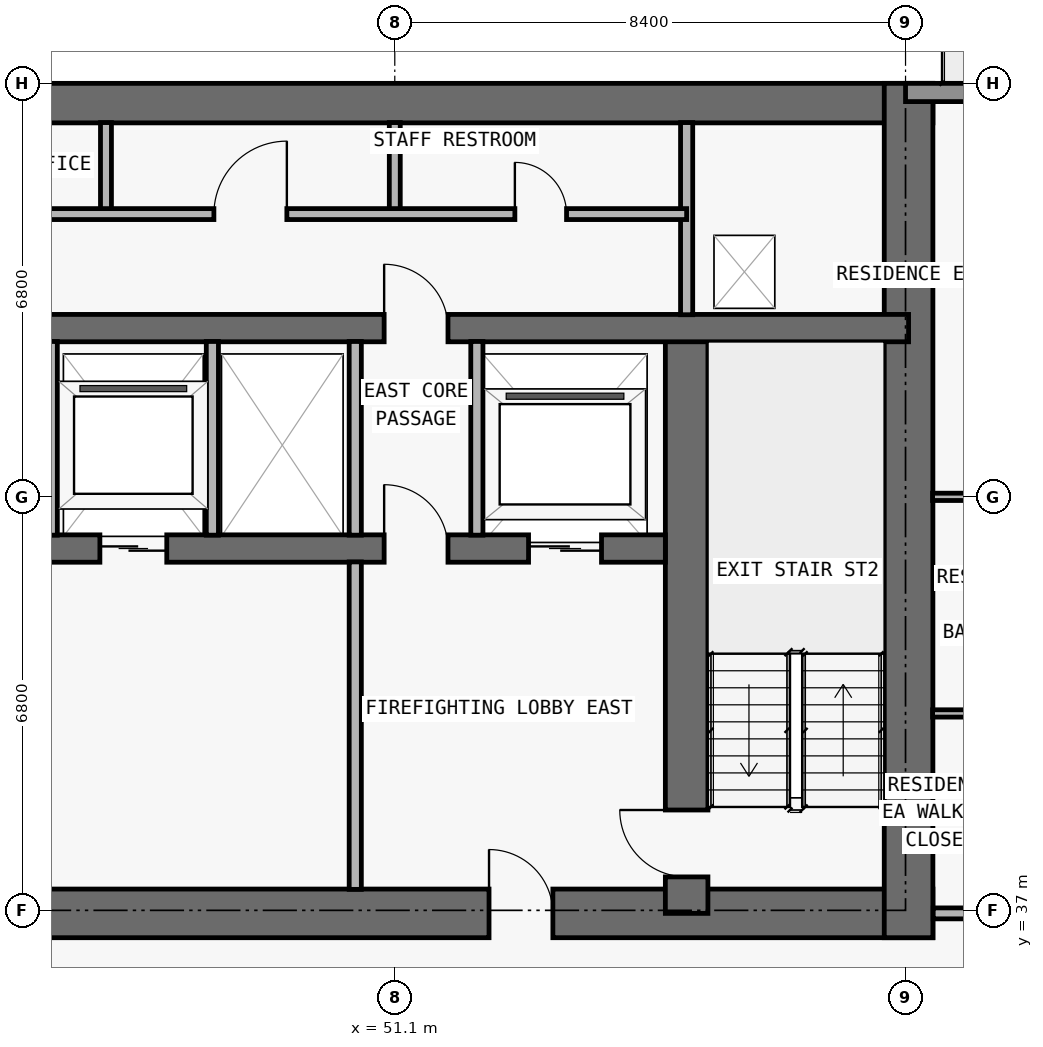
"""IFC4 building model, lengths in metres.
Left out: names, types, materials, properties, quantities, classifications, styles, units other than length and angle.
Written with IfcOpenShell. Run it as: python <this file> out.ifc"""

import sys

from ifc_helpers import new_model, si_unit, direction, frame, frame_2d, origin, place, context, subcontext, project, spatial, rectangle, extrude, element, fill, save


model = new_model("IFC4")
c1 = context("Model", 3, precision=1e-05, world=origin(), true_north=direction((0.0, 1.0)))
c2 = subcontext(c1, "Body", "Model", "MODEL_VIEW")
j1 = project(units=[si_unit("LENGTHUNIT", "METRE"), si_unit("PLANEANGLEUNIT", "RADIAN")], contexts=[c1])
p1 = place(None, origin())
s1 = spatial("IfcSite", under=j1, at=p1, CompositionType="ELEMENT")
p2 = place(p1, origin())
s2 = spatial("IfcBuilding", under=s1, at=p2, CompositionType="ELEMENT")
p3 = place(p2, frame((0.0, 0.0, 145.5)))
s3 = spatial("IfcBuildingStorey", under=s2, at=p3, CompositionType="ELEMENT", Elevation=145.5)
p4 = place(p3, frame((17.85, 36.95, 0.0), z_axis=(0.0, 0.0, 1.0), x_axis=(1.0, 0.0, 0.0)))
e1 = element("IfcWall", 1, at=p4, inside=s3, PredefinedType="SHEAR", context=c2, shape_type="SweptSolid", body=[
    extrude(rectangle(XDim=42.1, YDim=0.8, at=frame_2d((21.05, 0.0))), origin(), (0.0, 0.0, 1.0), 3.05),
])
p5 = place(p4, frame((14.45, 0.0, 0.0)))
e2 = element("IfcOpeningElement", 2, at=p5, cuts=e1, PredefinedType="OPENING", context=c2, shape_type="SweptSolid", body=[
    extrude(rectangle(XDim=1.1, YDim=2.15, at=frame_2d((0.55, 1.075))), frame((0.0, 0.41, 0.0), z_axis=(0.0, -1.0, 0.0), x_axis=(1.0, 0.0, 0.0)), (0.0, 0.0, 1.0), 0.82),
])
p6 = place(p4, frame((6.3, 0.0, 0.0)))
e3 = element("IfcOpeningElement", 3, at=p6, cuts=e1, PredefinedType="OPENING", context=c2, shape_type="SweptSolid", body=[
    extrude(rectangle(XDim=1.05, YDim=2.15, at=frame_2d((0.525, 1.075))), frame((0.0, 0.41, 0.0), z_axis=(0.0, -1.0, 0.0), x_axis=(1.0, 0.0, 0.0)), (0.0, 0.0, 1.0), 0.82),
])
p7 = place(p4, frame((34.8, 0.0, 0.0)))
e4 = element("IfcOpeningElement", 4, at=p7, cuts=e1, PredefinedType="OPENING", context=c2, shape_type="SweptSolid", body=[
    extrude(rectangle(XDim=1.05, YDim=2.15, at=frame_2d((0.525, 1.075))), frame((0.0, 0.41, 0.0), z_axis=(0.0, -1.0, 0.0), x_axis=(1.0, 0.0, 0.0)), (0.0, 0.0, 1.0), 0.82),
])
p8 = place(p4, frame((10.913, 0.0, 0.0)))
e5 = element("IfcOpeningElement", 5, at=p8, cuts=e1, PredefinedType="OPENING", context=c2, shape_type="SweptSolid", body=[
    extrude(rectangle(XDim=1.05, YDim=2.15, at=frame_2d((0.525, 1.075))), frame((0.0, 0.41, 0.0), z_axis=(0.0, -1.0, 0.0), x_axis=(1.0, 0.0, 0.0)), (0.0, 0.0, 1.0), 0.82),
])
p9 = place(p4, frame((24.15, 0.0, 0.0)))
e6 = element("IfcOpeningElement", 6, at=p9, cuts=e1, PredefinedType="OPENING", context=c2, shape_type="SweptSolid", body=[
    extrude(rectangle(XDim=1.05, YDim=2.15, at=frame_2d((0.525, 1.075))), frame((0.0, 0.41, 0.0), z_axis=(0.0, -1.0, 0.0), x_axis=(1.0, 0.0, 0.0)), (0.0, 0.0, 1.0), 0.82),
])
p10 = place(p3, frame((17.85, 50.275, 0.0), z_axis=(0.0, 0.0, 1.0), x_axis=(1.0, 0.0, 0.0)))
e7 = element("IfcWall", 7, at=p10, inside=s3, PredefinedType="SHEAR", context=c2, shape_type="SweptSolid", body=[
    extrude(rectangle(XDim=42.1, YDim=0.65, at=frame_2d((21.05, 0.0))), origin(), (0.0, 0.0, 1.0), 3.05),
])
p11 = place(p3, frame((59.55, 36.55, 0.0), z_axis=(0.0, 0.0, 1.0), x_axis=(0.0, 1.0, 0.0)))
e8 = element("IfcWall", 8, at=p11, inside=s3, PredefinedType="SHEAR", context=c2, shape_type="SweptSolid", body=[
    extrude(rectangle(XDim=14.05, YDim=0.8, at=frame_2d((7.025, 0.0))), origin(), (0.0, 0.0, 1.0), 3.05),
])
p12 = place(p3, frame((55.9, 36.95, 0.0), z_axis=(0.0, 0.0, 1.0), x_axis=(0.0, 1.0, 0.0)))
e9 = element("IfcWall", 9, at=p12, inside=s3, PredefinedType="SHEAR", context=c2, shape_type="SweptSolid", body=[
    extrude(rectangle(XDim=9.625, YDim=0.7, at=frame_2d((4.812, 0.0))), origin(), (0.0, 0.0, 1.0), 3.05),
])
p13 = place(p12, frame((0.6, 0.0, 0.0)))
e10 = element("IfcOpeningElement", 10, at=p13, cuts=e9, PredefinedType="OPENING", context=c2, shape_type="SweptSolid", body=[
    extrude(rectangle(XDim=1.1, YDim=2.15, at=frame_2d((0.55, 1.075))), frame((0.0, 0.36, 0.0), z_axis=(0.0, -1.0, 0.0), x_axis=(1.0, 0.0, 0.0)), (0.0, 0.0, 1.0), 0.72),
])
p14 = place(p3, frame((22.25, 42.95, 0.0), z_axis=(0.0, 0.0, 1.0), x_axis=(1.0, 0.0, 0.0)))
e11 = element("IfcWall", 11, at=p14, inside=s3, PredefinedType="SHEAR", context=c2, shape_type="SweptSolid", body=[
    extrude(rectangle(XDim=33.3, YDim=0.45, at=frame_2d((16.65, 0.0))), origin(), (0.0, 0.0, 1.0), 3.05),
])
p15 = place(p14, frame((1.05, 0.0, 0.0)))
e12 = element("IfcOpeningElement", 12, at=p15, cuts=e11, PredefinedType="OPENING", context=c2, shape_type="SweptSolid", body=[
    extrude(rectangle(XDim=1.2, YDim=2.2, at=frame_2d((0.6, 1.1))), frame((0.0, 0.235, 0.0), z_axis=(0.0, -1.0, 0.0), x_axis=(1.0, 0.0, 0.0)), (0.0, 0.0, 1.0), 0.47),
])
p16 = place(p14, frame((31.05, 0.0, 0.0)))
e13 = element("IfcOpeningElement", 13, at=p16, cuts=e11, PredefinedType="OPENING", context=c2, shape_type="SweptSolid", body=[
    extrude(rectangle(XDim=1.2, YDim=2.2, at=frame_2d((0.6, 1.1))), frame((0.0, 0.235, 0.0), z_axis=(0.0, -1.0, 0.0), x_axis=(1.0, 0.0, 0.0)), (0.0, 0.0, 1.0), 0.47),
])
p17 = place(p14, frame((21.4, 0.0, 0.0)))
e14 = element("IfcOpeningElement", 14, at=p17, cuts=e11, PredefinedType="OPENING", context=c2, shape_type="SweptSolid", body=[
    extrude(rectangle(XDim=1.1, YDim=2.2, at=frame_2d((0.55, 1.1))), frame((0.0, 0.235, 0.0), z_axis=(0.0, -1.0, 0.0), x_axis=(1.0, 0.0, 0.0)), (0.0, 0.0, 1.0), 0.47),
])
p18 = place(p14, frame((24.0, 0.0, 0.0)))
e15 = element("IfcOpeningElement", 15, at=p18, cuts=e11, PredefinedType="OPENING", context=c2, shape_type="SweptSolid", body=[
    extrude(rectangle(XDim=1.1, YDim=2.2, at=frame_2d((0.55, 1.1))), frame((0.0, 0.235, 0.0), z_axis=(0.0, -1.0, 0.0), x_axis=(1.0, 0.0, 0.0)), (0.0, 0.0, 1.0), 0.47),
])
p19 = place(p14, frame((3.625, 0.0, 0.0)))
e16 = element("IfcOpeningElement", 16, at=p19, cuts=e11, PredefinedType="OPENING", context=c2, shape_type="SweptSolid", body=[
    extrude(rectangle(XDim=1.05, YDim=2.15, at=frame_2d((0.525, 1.075))), frame((0.0, 0.235, 0.0), z_axis=(0.0, -1.0, 0.0), x_axis=(1.0, 0.0, 0.0)), (0.0, 0.0, 1.0), 0.47),
])
p20 = place(p14, frame((28.675, 0.0, 0.0)))
e17 = element("IfcOpeningElement", 17, at=p20, cuts=e11, PredefinedType="OPENING", context=c2, shape_type="SweptSolid", body=[
    extrude(rectangle(XDim=1.05, YDim=2.15, at=frame_2d((0.525, 1.075))), frame((0.0, 0.235, 0.0), z_axis=(0.0, -1.0, 0.0), x_axis=(1.0, 0.0, 0.0)), (0.0, 0.0, 1.0), 0.47),
])
p21 = place(p14, frame((13.925, 0.0, 0.0)))
e18 = element("IfcOpeningElement", 18, at=p21, cuts=e11, PredefinedType="OPENING", context=c2, shape_type="SweptSolid", body=[
    extrude(rectangle(XDim=1.0, YDim=2.2, at=frame_2d((0.5, 1.1))), frame((0.0, 0.235, 0.0), z_axis=(0.0, -1.0, 0.0), x_axis=(1.0, 0.0, 0.0)), (0.0, 0.0, 1.0), 0.47),
])
p22 = place(p14, frame((18.05, 0.0, 0.0)))
e19 = element("IfcOpeningElement", 19, at=p22, cuts=e11, PredefinedType="OPENING", context=c2, shape_type="SweptSolid", body=[
    extrude(rectangle(XDim=1.0, YDim=2.2, at=frame_2d((0.5, 1.1))), frame((0.0, 0.235, 0.0), z_axis=(0.0, -1.0, 0.0), x_axis=(1.0, 0.0, 0.0)), (0.0, 0.0, 1.0), 0.47),
])
p23 = place(p3, frame((18.25, 46.575, 0.0), z_axis=(0.0, 0.0, 1.0), x_axis=(1.0, 0.0, 0.0)))
e20 = element("IfcWall", 20, at=p23, inside=s3, PredefinedType="SHEAR", context=c2, shape_type="SweptSolid", body=[
    extrude(rectangle(XDim=41.3, YDim=0.45, at=frame_2d((20.65, 0.0))), origin(), (0.0, 0.0, 1.0), 3.05),
])
p24 = place(p23, frame((7.625, 0.0, 0.0)))
e21 = element("IfcOpeningElement", 21, at=p24, cuts=e20, PredefinedType="OPENING", context=c2, shape_type="SweptSolid", body=[
    extrude(rectangle(XDim=1.05, YDim=2.15, at=frame_2d((0.525, 1.075))), frame((0.0, 0.235, 0.0), z_axis=(0.0, -1.0, 0.0), x_axis=(1.0, 0.0, 0.0)), (0.0, 0.0, 1.0), 0.47),
])
p25 = place(p23, frame((32.675, 0.0, 0.0)))
e22 = element("IfcOpeningElement", 22, at=p25, cuts=e20, PredefinedType="OPENING", context=c2, shape_type="SweptSolid", body=[
    extrude(rectangle(XDim=1.05, YDim=2.15, at=frame_2d((0.525, 1.075))), frame((0.0, 0.235, 0.0), z_axis=(0.0, -1.0, 0.0), x_axis=(1.0, 0.0, 0.0)), (0.0, 0.0, 1.0), 0.47),
])
p26 = place(p3, frame((59.5, 50.45, 0.0), z_axis=(0.0, 0.0, 1.0), x_axis=(1.0, 0.0, 0.0)))
e23 = element("IfcWall", 23, at=p26, inside=s3, PredefinedType="STANDARD", context=c2, shape_type="SweptSolid", body=[
    extrude(rectangle(XDim=10.6, YDim=0.3, at=frame_2d((5.3, 0.0))), origin(), (0.0, 0.0, 1.0), 3.05),
])
p27 = place(p26, frame((4.3, 0.0, 0.0)))
e24 = element("IfcOpeningElement", 24, at=p27, cuts=e23, PredefinedType="OPENING", context=c2, shape_type="SweptSolid", body=[
    extrude(rectangle(XDim=2.0, YDim=2.3, at=frame_2d((1.0, 1.15))), frame((0.0, 0.16, 0.0), z_axis=(0.0, -1.0, 0.0), x_axis=(1.0, 0.0, 0.0)), (0.0, 0.0, 1.0), 0.32),
])
p28 = place(p3, frame((45.45, 43.17, 0.0), z_axis=(0.0, 0.0, 1.0), x_axis=(0.0, 1.0, 0.0)))
e25 = element("IfcWall", 25, at=p28, inside=s3, PredefinedType="PARTITIONING", context=c2, shape_type="SweptSolid", body=[
    extrude(rectangle(XDim=3.185, YDim=0.2, at=frame_2d((1.593, 0.0))), origin(), (0.0, 0.0, 1.0), 3.05),
])
p29 = place(p3, frame((46.35, 48.45, 0.0), z_axis=(0.0, 0.0, 1.0), x_axis=(0.0, 1.0, 0.0)))
e26 = element("IfcWall", 26, at=p29, inside=s3, PredefinedType="PARTITIONING", context=c2, shape_type="SweptSolid", body=[
    extrude(rectangle(XDim=1.505, YDim=0.18, at=frame_2d((0.752, 0.0))), origin(), (0.0, 0.0, 1.0), 3.05),
])
p30 = place(p3, frame((48.1, 43.17, 0.0), z_axis=(0.0, 0.0, 1.0), x_axis=(0.0, 1.0, 0.0)))
e27 = element("IfcWall", 27, at=p30, inside=s3, PredefinedType="PARTITIONING", context=c2, shape_type="SweptSolid", body=[
    extrude(rectangle(XDim=3.185, YDim=0.2, at=frame_2d((1.593, 0.0))), origin(), (0.0, 0.0, 1.0), 3.05),
])
p31 = place(p3, frame((50.45, 37.345, 0.0), z_axis=(0.0, 0.0, 1.0), x_axis=(0.0, 1.0, 0.0)))
e28 = element("IfcWall", 28, at=p31, inside=s3, PredefinedType="PARTITIONING", context=c2, shape_type="SweptSolid", body=[
    extrude(rectangle(XDim=5.385, YDim=0.2, at=frame_2d((2.692, 0.0))), origin(), (0.0, 0.0, 1.0), 3.05),
])
p32 = place(p3, frame((50.45, 43.17, 0.0), z_axis=(0.0, 0.0, 1.0), x_axis=(0.0, 1.0, 0.0)))
e29 = element("IfcWall", 29, at=p32, inside=s3, PredefinedType="PARTITIONING", context=c2, shape_type="SweptSolid", body=[
    extrude(rectangle(XDim=3.185, YDim=0.2, at=frame_2d((1.593, 0.0))), origin(), (0.0, 0.0, 1.0), 3.05),
])
p33 = place(p3, frame((51.1, 48.45, 0.0), z_axis=(0.0, 0.0, 1.0), x_axis=(0.0, 1.0, 0.0)))
e30 = element("IfcWall", 30, at=p33, inside=s3, PredefinedType="PARTITIONING", context=c2, shape_type="SweptSolid", body=[
    extrude(rectangle(XDim=1.505, YDim=0.18, at=frame_2d((0.752, 0.0))), origin(), (0.0, 0.0, 1.0), 3.05),
])
p34 = place(p3, frame((52.45, 43.17, 0.0), z_axis=(0.0, 0.0, 1.0), x_axis=(0.0, 1.0, 0.0)))
e31 = element("IfcWall", 31, at=p34, inside=s3, PredefinedType="PARTITIONING", context=c2, shape_type="SweptSolid", body=[
    extrude(rectangle(XDim=3.185, YDim=0.2, at=frame_2d((1.593, 0.0))), origin(), (0.0, 0.0, 1.0), 3.05),
])
p35 = place(p3, frame((55.9, 46.795, 0.0), z_axis=(0.0, 0.0, 1.0), x_axis=(0.0, 1.0, 0.0)))
e32 = element("IfcWall", 32, at=p35, inside=s3, PredefinedType="PARTITIONING", context=c2, shape_type="SweptSolid", body=[
    extrude(rectangle(XDim=3.16, YDim=0.2, at=frame_2d((1.58, 0.0))), origin(), (0.0, 0.0, 1.0), 3.05),
])
p36 = place(p3, frame((59.955, 36.95, 0.0), z_axis=(0.0, 0.0, 1.0), x_axis=(1.0, 0.0, 0.0)))
e33 = element("IfcWall", 33, at=p36, inside=s3, PredefinedType="PARTITIONING", context=c2, shape_type="SweptSolid", body=[
    extrude(rectangle(XDim=10.145, YDim=0.18, at=frame_2d((5.073, 0.0))), origin(), (0.0, 0.0, 1.0), 3.05),
])
p37 = place(p36, frame((3.957, 0.0, 0.0)))
e34 = element("IfcOpeningElement", 34, at=p37, cuts=e33, PredefinedType="OPENING", context=c2, shape_type="SweptSolid", body=[
    extrude(rectangle(XDim=1.0, YDim=2.2, at=frame_2d((0.5, 1.1))), frame((0.0, 0.1, 0.0), z_axis=(0.0, -1.0, 0.0), x_axis=(1.0, 0.0, 0.0)), (0.0, 0.0, 1.0), 0.2),
])
p38 = place(p3, frame((59.945, 40.238, 0.0), z_axis=(0.0, 0.0, 1.0), x_axis=(1.0, 0.0, 0.0)))
e35 = element("IfcWall", 35, at=p38, inside=s3, PredefinedType="PARTITIONING", context=c2, shape_type="SweptSolid", body=[
    extrude(rectangle(XDim=2.255, YDim=0.12, at=frame_2d((1.127, 0.0))), origin(), (0.0, 0.0, 1.0), 3.05),
])
p39 = place(p3, frame((59.945, 43.8, 0.0), z_axis=(0.0, 0.0, 1.0), x_axis=(1.0, 0.0, 0.0)))
e36 = element("IfcWall", 36, at=p39, inside=s3, PredefinedType="PARTITIONING", context=c2, shape_type="SweptSolid", body=[
    extrude(rectangle(XDim=13.66, YDim=0.12, at=frame_2d((6.83, 0.0))), origin(), (0.0, 0.0, 1.0), 2.339),
])
p40 = place(p39, frame((4.017, 0.0, 0.0)))
e37 = element("IfcOpeningElement", 37, at=p40, cuts=e36, PredefinedType="OPENING", context=c2, shape_type="SweptSolid", body=[
    extrude(rectangle(XDim=0.9, YDim=2.15, at=frame_2d((0.45, 1.075))), frame((0.0, 0.07, 0.0), z_axis=(0.0, -1.0, 0.0), x_axis=(1.0, 0.0, 0.0)), (0.0, 0.0, 1.0), 0.14),
])
p41 = place(p39, frame((0.702, 0.0, 0.0)))
e38 = element("IfcOpeningElement", 38, at=p41, cuts=e36, PredefinedType="OPENING", context=c2, shape_type="SweptSolid", body=[
    extrude(rectangle(XDim=0.85, YDim=2.1, at=frame_2d((0.425, 1.05))), frame((0.0, 0.07, 0.0), z_axis=(0.0, -1.0, 0.0), x_axis=(1.0, 0.0, 0.0)), (0.0, 0.0, 1.0), 0.14),
])
p42 = place(p3, frame((26.7, 48.45, 0.0), z_axis=(0.0, 0.0, 1.0), x_axis=(1.0, 0.0, 0.0)))
e39 = element("IfcWall", 39, at=p42, inside=s3, PredefinedType="PARTITIONING", context=c2, shape_type="SweptSolid", body=[
    extrude(rectangle(XDim=29.2, YDim=0.18, at=frame_2d((14.6, 0.0))), origin(), (0.0, 0.0, 1.0), 3.05),
])
p43 = place(p42, frame((1.75, 0.0, 0.0)))
e40 = element("IfcOpeningElement", 40, at=p43, cuts=e39, PredefinedType="OPENING", context=c2, shape_type="SweptSolid", body=[
    extrude(rectangle(XDim=1.2, YDim=2.2, at=frame_2d((0.6, 1.1))), frame((0.0, 0.1, 0.0), z_axis=(0.0, -1.0, 0.0), x_axis=(1.0, 0.0, 0.0)), (0.0, 0.0, 1.0), 0.2),
])
p44 = place(p42, frame((6.475, 0.0, 0.0)))
e41 = element("IfcOpeningElement", 41, at=p44, cuts=e39, PredefinedType="OPENING", context=c2, shape_type="SweptSolid", body=[
    extrude(rectangle(XDim=1.2, YDim=2.2, at=frame_2d((0.6, 1.1))), frame((0.0, 0.1, 0.0), z_axis=(0.0, -1.0, 0.0), x_axis=(1.0, 0.0, 0.0)), (0.0, 0.0, 1.0), 0.2),
])
p45 = place(p42, frame((14.05, 0.0, 0.0)))
e42 = element("IfcOpeningElement", 42, at=p45, cuts=e39, PredefinedType="OPENING", context=c2, shape_type="SweptSolid", body=[
    extrude(rectangle(XDim=1.0, YDim=2.2, at=frame_2d((0.5, 1.1))), frame((0.0, 0.1, 0.0), z_axis=(0.0, -1.0, 0.0), x_axis=(1.0, 0.0, 0.0)), (0.0, 0.0, 1.0), 0.2),
])
p46 = place(p42, frame((21.425, 0.0, 0.0)))
e43 = element("IfcOpeningElement", 43, at=p46, cuts=e39, PredefinedType="OPENING", context=c2, shape_type="SweptSolid", body=[
    extrude(rectangle(XDim=1.2, YDim=2.2, at=frame_2d((0.6, 1.1))), frame((0.0, 0.1, 0.0), z_axis=(0.0, -1.0, 0.0), x_axis=(1.0, 0.0, 0.0)), (0.0, 0.0, 1.0), 0.2),
])
p47 = place(p42, frame((26.375, 0.0, 0.0)))
e44 = element("IfcOpeningElement", 44, at=p47, cuts=e39, PredefinedType="OPENING", context=c2, shape_type="SweptSolid", body=[
    extrude(rectangle(XDim=0.85, YDim=2.1, at=frame_2d((0.425, 1.05))), frame((0.0, 0.1, 0.0), z_axis=(0.0, -1.0, 0.0), x_axis=(1.0, 0.0, 0.0)), (0.0, 0.0, 1.0), 0.2),
])
p48 = place(p16, origin())
e45 = element("IfcDoor", 45, at=p48, inside=s3, OperationType="DOUBLE_DOOR_SLIDING", PredefinedType="DOOR", context=c2, shape_type="SweptSolid", body=[
    extrude(rectangle(XDim=1.2, YDim=2.2, at=frame_2d((0.6, 1.1))), frame((0.0, 0.025, 0.0), z_axis=(0.0, -1.0, 0.0), x_axis=(1.0, 0.0, 0.0)), (0.0, 0.0, 1.0), 0.05),
])
fill(e13, e45)
p49 = place(p18, origin())
e46 = element("IfcDoor", 46, at=p49, inside=s3, OperationType="DOUBLE_DOOR_SLIDING", PredefinedType="DOOR", context=c2, shape_type="SweptSolid", body=[
    extrude(rectangle(XDim=1.1, YDim=2.2, at=frame_2d((0.55, 1.1))), frame((0.0, 0.025, 0.0), z_axis=(0.0, -1.0, 0.0), x_axis=(1.0, 0.0, 0.0)), (0.0, 0.0, 1.0), 0.05),
])
fill(e15, e46)
p50 = place(p7, origin())
e47 = element("IfcDoor", 47, at=p50, inside=s3, OperationType="SINGLE_SWING_LEFT", PredefinedType="DOOR", context=c2, shape_type="SweptSolid", body=[
    extrude(rectangle(XDim=1.05, YDim=2.15, at=frame_2d((0.525, 1.075))), frame((0.0, 0.025, 0.0), z_axis=(0.0, -1.0, 0.0), x_axis=(1.0, 0.0, 0.0)), (0.0, 0.0, 1.0), 0.05),
])
fill(e4, e47)
p51 = place(p13, origin())
e48 = element("IfcDoor", 48, at=p51, inside=s3, OperationType="SINGLE_SWING_RIGHT", PredefinedType="DOOR", context=c2, shape_type="SweptSolid", body=[
    extrude(rectangle(XDim=1.1, YDim=2.15, at=frame_2d((0.55, 1.075))), frame((0.0, 0.025, 0.0), z_axis=(0.0, -1.0, 0.0), x_axis=(1.0, 0.0, 0.0)), (0.0, 0.0, 1.0), 0.05),
])
fill(e10, e48)
p52 = place(p20, origin())
e49 = element("IfcDoor", 49, at=p52, inside=s3, OperationType="SINGLE_SWING_LEFT", PredefinedType="DOOR", context=c2, shape_type="SweptSolid", body=[
    extrude(rectangle(XDim=1.05, YDim=2.15, at=frame_2d((0.525, 1.075))), frame((0.0, 0.025, 0.0), z_axis=(0.0, -1.0, 0.0), x_axis=(1.0, 0.0, 0.0)), (0.0, 0.0, 1.0), 0.05),
])
fill(e17, e49)
p53 = place(p25, origin())
e50 = element("IfcDoor", 50, at=p53, inside=s3, OperationType="SINGLE_SWING_LEFT", PredefinedType="DOOR", context=c2, shape_type="SweptSolid", body=[
    extrude(rectangle(XDim=1.05, YDim=2.15, at=frame_2d((0.525, 1.075))), frame((0.0, 0.025, 0.0), z_axis=(0.0, -1.0, 0.0), x_axis=(1.0, 0.0, 0.0)), (0.0, 0.0, 1.0), 0.05),
])
fill(e22, e50)
p54 = place(p46, origin())
e51 = element("IfcDoor", 51, at=p54, inside=s3, OperationType="SINGLE_SWING_RIGHT", PredefinedType="DOOR", context=c2, shape_type="SweptSolid", body=[
    extrude(rectangle(XDim=1.2, YDim=2.2, at=frame_2d((0.6, 1.1))), frame((0.0, 0.025, 0.0), z_axis=(0.0, -1.0, 0.0), x_axis=(1.0, 0.0, 0.0)), (0.0, 0.0, 1.0), 0.05),
])
fill(e43, e51)
p55 = place(p47, origin())
e52 = element("IfcDoor", 52, at=p55, inside=s3, OperationType="SINGLE_SWING_LEFT", PredefinedType="DOOR", context=c2, shape_type="SweptSolid", body=[
    extrude(rectangle(XDim=0.85, YDim=2.1, at=frame_2d((0.425, 1.05))), frame((0.0, 0.025, 0.0), z_axis=(0.0, -1.0, 0.0), x_axis=(1.0, 0.0, 0.0)), (0.0, 0.0, 1.0), 0.05),
])
fill(e44, e52)
save(model, sys.argv[1])
